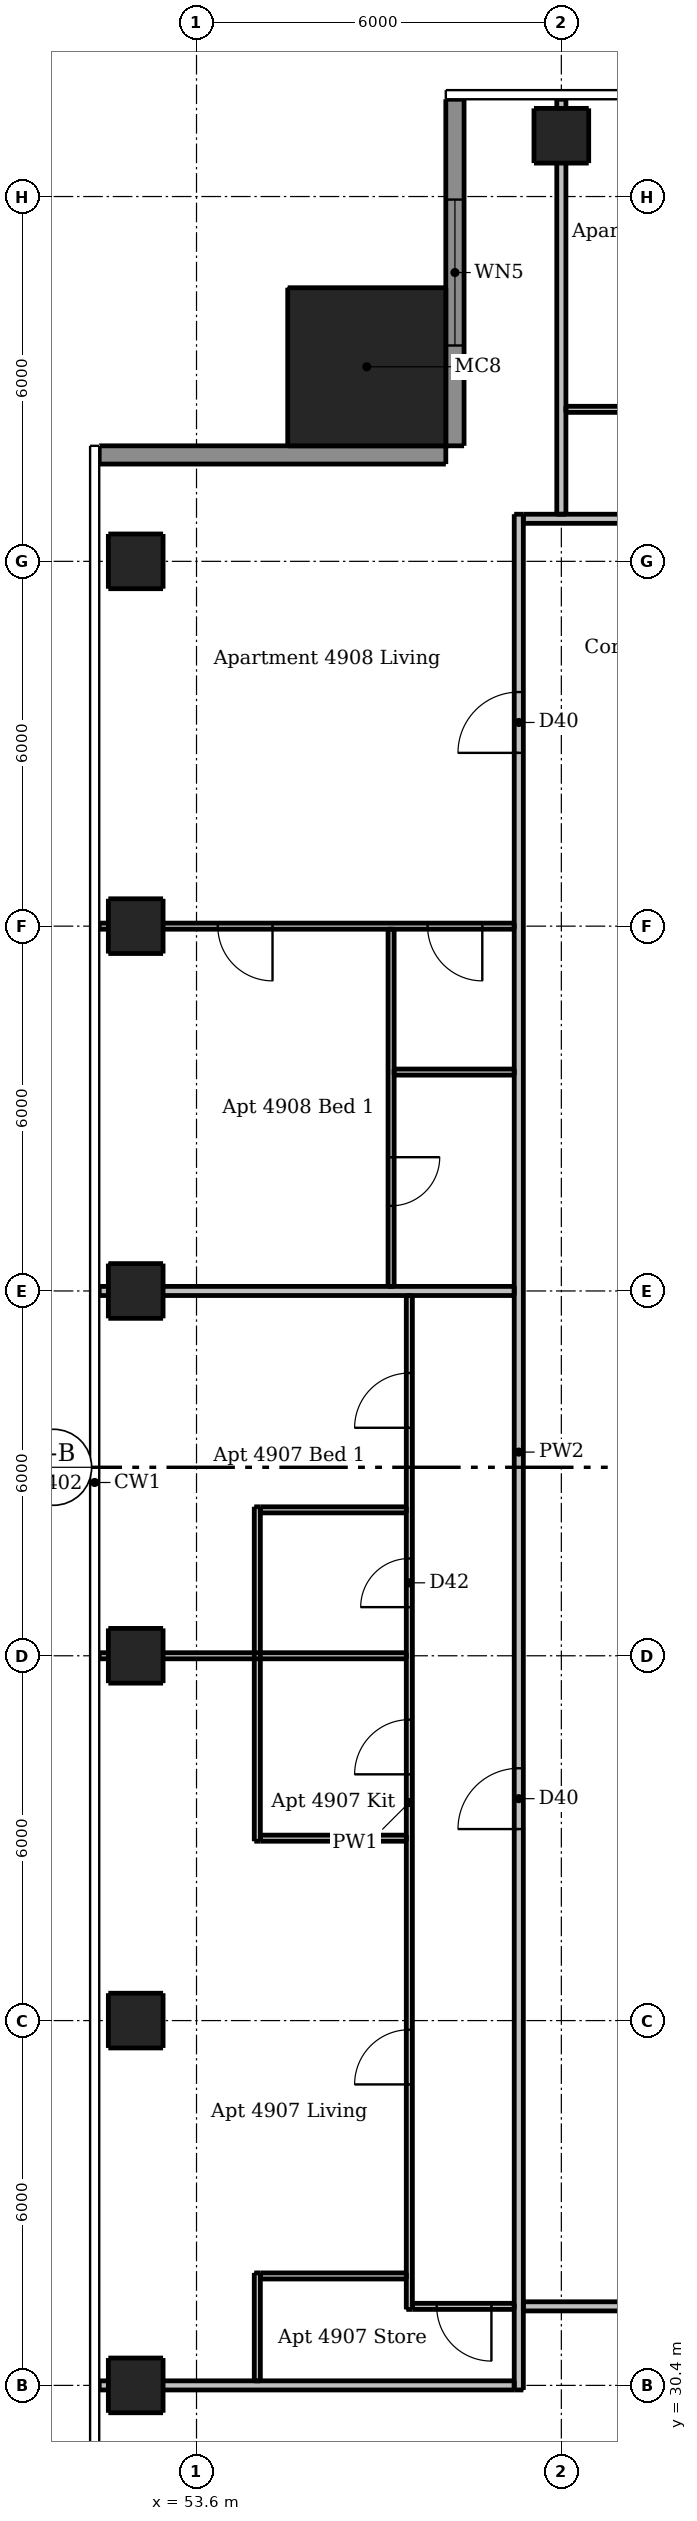
"""IFC4 building model, lengths in metres.
Left out: names, types, materials, properties, quantities, classifications, styles, units other than length and angle.
Written with IfcOpenShell. Run it as: python <this file> out.ifc"""

import sys

from ifc_helpers import new_model, si_unit, direction, frame, frame_2d, origin, origin_2d, place, context, subcontext, project, spatial, rectangle, extrude, element, fill, save


model = new_model("IFC4")
c1 = context("Model", 3, precision=1e-05, world=origin(), true_north=direction((0.0, 1.0)))
c2 = subcontext(c1, "Body", "Model", "MODEL_VIEW")
j1 = project(units=[si_unit("LENGTHUNIT", "METRE"), si_unit("PLANEANGLEUNIT", "RADIAN")], contexts=[c1])
p1 = place(None, origin())
s1 = spatial("IfcSite", under=j1, at=p1, CompositionType="ELEMENT")
p2 = place(p1, origin())
s2 = spatial("IfcBuilding", under=s1, at=p2, CompositionType="ELEMENT")
p3 = place(p2, frame((0.0, 0.0, 187.0)))
s3 = spatial("IfcBuildingStorey", under=s2, at=p3, CompositionType="ELEMENT", Elevation=187.0)
for number, where, z_axis, x_axis in (
    (1, (59.6, 67.4, 0.0), (0.0, 0.0, 1.0), (1.0, 0.0, 0.0)),
    (2, (52.6, 30.4, 0.0), (0.0, 0.0, 1.0), (1.0, 0.0, 0.0)),
    (3, (52.6, 36.4, 0.0), (0.0, 0.0, 1.0), (1.0, 0.0, 0.0)),
    (4, (52.6, 42.4, 0.0), (0.0, 0.0, 1.0), (1.0, 0.0, 0.0)),
    (5, (52.6, 48.4, 0.0), (0.0, 0.0, 1.0), (1.0, 0.0, 0.0)),
    (6, (52.6, 54.4, 0.0), (0.0, 0.0, 1.0), (1.0, 0.0, 0.0)),
    (7, (52.6, 60.4, 0.0), (0.0, 0.0, 1.0), (1.0, 0.0, 0.0)),
):
    element("IfcColumn", number, at=place(p3, frame(where, z_axis=z_axis, x_axis=x_axis)), inside=s3, PredefinedType="COLUMN", context=c2, shape_type="SweptSolid", body=[
        extrude(rectangle(XDim=0.9, YDim=0.9, at=origin_2d()), origin(), (0.0, 0.0, 1.0), 3.05),
    ])
p4 = place(p3, frame((56.4, 63.6, 0.0), z_axis=(0.0, 0.0, 1.0), x_axis=(1.0, 0.0, 0.0)))
e8 = element("IfcColumn", 8, at=p4, inside=s3, PredefinedType="COLUMN", context=c2, shape_type="SweptSolid", body=[
    extrude(rectangle(XDim=2.6, YDim=2.6, at=origin_2d()), origin(), (0.0, 0.0, 1.0), 3.3),
])
p5 = place(p3, frame((57.85, 68.0, 0.0), z_axis=(0.0, 0.0, 1.0), x_axis=(0.0, -1.0, 0.0)))
e9 = element("IfcWall", 9, at=p5, inside=s3, PredefinedType="SOLIDWALL", context=c2, shape_type="SweptSolid", body=[
    extrude(rectangle(XDim=5.7, YDim=0.3, at=frame_2d((2.85, 0.0))), origin(), (0.0, 0.0, 1.0), 3.05),
])
p6 = place(p5, frame((1.65, 0.0, 0.15)))
e10 = element("IfcOpeningElement", 10, at=p6, cuts=e9, PredefinedType="OPENING", context=c2, shape_type="SweptSolid", body=[
    extrude(rectangle(XDim=2.4, YDim=2.1, at=frame_2d((1.2, 1.05))), frame((0.0, 0.16, 0.0), z_axis=(0.0, -1.0, 0.0), x_axis=(1.0, 0.0, 0.0)), (0.0, 0.0, 1.0), 0.32),
])
p7 = place(p3, frame((57.7, 62.15, 0.0), z_axis=(0.0, 0.0, 1.0), x_axis=(-1.0, 0.0, 0.0)))
e11 = element("IfcWall", 11, at=p7, inside=s3, PredefinedType="SOLIDWALL", context=c2, shape_type="SweptSolid", body=[
    extrude(rectangle(XDim=5.7, YDim=0.3, at=frame_2d((2.85, 0.0))), origin(), (0.0, 0.0, 1.0), 3.05),
])
p8 = place(p3, frame((54.6, 30.475, 0.0), z_axis=(0.0, 0.0, 1.0), x_axis=(0.0, 1.0, 0.0)))
e12 = element("IfcWall", 12, at=p8, inside=s3, PredefinedType="PARTITIONING", context=c2, shape_type="SweptSolid", body=[
    extrude(rectangle(XDim=1.775, YDim=0.1, at=frame_2d((0.887, 0.0))), origin(), (0.0, 0.0, 1.0), 3.05),
])
p9 = place(p3, frame((54.6, 39.35, 0.0), z_axis=(0.0, 0.0, 1.0), x_axis=(0.0, 1.0, 0.0)))
e13 = element("IfcWall", 13, at=p9, inside=s3, PredefinedType="PARTITIONING", context=c2, shape_type="SweptSolid", body=[
    extrude(rectangle(XDim=5.5, YDim=0.1, at=frame_2d((2.75, 0.0))), origin(), (0.0, 0.0, 1.0), 3.05),
])
p10 = place(p3, frame((56.8, 54.35, 0.0), z_axis=(0.0, 0.0, 1.0), x_axis=(0.0, -1.0, 0.0)))
e14 = element("IfcWall", 14, at=p10, inside=s3, PredefinedType="PARTITIONING", context=c2, shape_type="SweptSolid", body=[
    extrude(rectangle(XDim=5.875, YDim=0.1, at=frame_2d((2.938, 0.0))), origin(), (0.0, 0.0, 1.0), 3.05),
])
p11 = place(p10, frame((3.75, 0.0, 0.0)))
e15 = element("IfcOpeningElement", 15, at=p11, cuts=e14, PredefinedType="OPENING", context=c2, shape_type="SweptSolid", body=[
    extrude(rectangle(XDim=0.8, YDim=2.1, at=frame_2d((0.4, 1.05))), frame((0.0, 0.06, 0.0), z_axis=(0.0, -1.0, 0.0), x_axis=(1.0, 0.0, 0.0)), (0.0, 0.0, 1.0), 0.12),
])
p12 = place(p3, frame((57.1, 31.65, 0.0), z_axis=(0.0, 0.0, 1.0), x_axis=(0.0, 1.0, 0.0)))
e16 = element("IfcWall", 16, at=p12, inside=s3, PredefinedType="PARTITIONING", context=c2, shape_type="SweptSolid", body=[
    extrude(rectangle(XDim=16.675, YDim=0.1, at=frame_2d((8.337, 0.0))), origin(), (0.0, 0.0, 1.0), 3.05),
])
p13 = place(p12, frame((3.7, 0.0, 0.0)))
e17 = element("IfcOpeningElement", 17, at=p13, cuts=e16, PredefinedType="OPENING", context=c2, shape_type="SweptSolid", body=[
    extrude(rectangle(XDim=0.9, YDim=2.1, at=frame_2d((0.45, 1.05))), frame((0.0, 0.06, 0.0), z_axis=(0.0, -1.0, 0.0), x_axis=(1.0, 0.0, 0.0)), (0.0, 0.0, 1.0), 0.12),
])
p14 = place(p12, frame((8.8, 0.0, 0.0)))
e18 = element("IfcOpeningElement", 18, at=p14, cuts=e16, PredefinedType="OPENING", context=c2, shape_type="SweptSolid", body=[
    extrude(rectangle(XDim=0.9, YDim=2.1, at=frame_2d((0.45, 1.05))), frame((0.0, 0.06, 0.0), z_axis=(0.0, -1.0, 0.0), x_axis=(1.0, 0.0, 0.0)), (0.0, 0.0, 1.0), 0.12),
])
p15 = place(p12, frame((14.5, 0.0, 0.0)))
e19 = element("IfcOpeningElement", 19, at=p15, cuts=e16, PredefinedType="OPENING", context=c2, shape_type="SweptSolid", body=[
    extrude(rectangle(XDim=0.9, YDim=2.1, at=frame_2d((0.45, 1.05))), frame((0.0, 0.06, 0.0), z_axis=(0.0, -1.0, 0.0), x_axis=(1.0, 0.0, 0.0)), (0.0, 0.0, 1.0), 0.12),
])
p16 = place(p12, frame((11.55, 0.0, 0.0)))
e20 = element("IfcOpeningElement", 20, at=p16, cuts=e16, PredefinedType="OPENING", context=c2, shape_type="SweptSolid", body=[
    extrude(rectangle(XDim=0.8, YDim=2.1, at=frame_2d((0.4, 1.05))), frame((0.0, 0.06, 0.0), z_axis=(0.0, -1.0, 0.0), x_axis=(1.0, 0.0, 0.0)), (0.0, 0.0, 1.0), 0.12),
])
p17 = place(p3, frame((59.675, 62.9, 0.0), z_axis=(0.0, 0.0, 1.0), x_axis=(1.0, 0.0, 0.0)))
e21 = element("IfcWall", 21, at=p17, inside=s3, PredefinedType="PARTITIONING", context=c2, shape_type="SweptSolid", body=[
    extrude(rectangle(XDim=17.85, YDim=0.1, at=frame_2d((8.925, 0.0))), origin(), (0.0, 0.0, 1.0), 3.05),
])
p18 = place(p17, frame((10.875, 0.0, 0.0)))
e22 = element("IfcOpeningElement", 22, at=p18, cuts=e21, PredefinedType="OPENING", context=c2, shape_type="SweptSolid", body=[
    extrude(rectangle(XDim=0.9, YDim=2.1, at=frame_2d((0.45, 1.05))), frame((0.0, 0.06, 0.0), z_axis=(0.0, -1.0, 0.0), x_axis=(1.0, 0.0, 0.0)), (0.0, 0.0, 1.0), 0.12),
])
p19 = place(p17, frame((15.975, 0.0, 0.0)))
e23 = element("IfcOpeningElement", 23, at=p19, cuts=e21, PredefinedType="OPENING", context=c2, shape_type="SweptSolid", body=[
    extrude(rectangle(XDim=0.9, YDim=2.1, at=frame_2d((0.45, 1.05))), frame((0.0, 0.06, 0.0), z_axis=(0.0, -1.0, 0.0), x_axis=(1.0, 0.0, 0.0)), (0.0, 0.0, 1.0), 0.12),
])
p20 = place(p17, frame((6.375, 0.0, 0.0)))
e24 = element("IfcOpeningElement", 24, at=p20, cuts=e21, PredefinedType="OPENING", context=c2, shape_type="SweptSolid", body=[
    extrude(rectangle(XDim=0.9, YDim=2.1, at=frame_2d((0.45, 1.05))), frame((0.0, 0.06, 0.0), z_axis=(0.0, -1.0, 0.0), x_axis=(1.0, 0.0, 0.0)), (0.0, 0.0, 1.0), 0.12),
])
p21 = place(p17, frame((1.275, 0.0, 0.0)))
e25 = element("IfcOpeningElement", 25, at=p21, cuts=e21, PredefinedType="OPENING", context=c2, shape_type="SweptSolid", body=[
    extrude(rectangle(XDim=0.9, YDim=2.1, at=frame_2d((0.45, 1.05))), frame((0.0, 0.06, 0.0), z_axis=(0.0, -1.0, 0.0), x_axis=(1.0, 0.0, 0.0)), (0.0, 0.0, 1.0), 0.12),
])
p22 = place(p17, frame((4.325, 0.0, 0.0)))
e26 = element("IfcOpeningElement", 26, at=p22, cuts=e21, PredefinedType="OPENING", context=c2, shape_type="SweptSolid", body=[
    extrude(rectangle(XDim=0.8, YDim=2.1, at=frame_2d((0.4, 1.05))), frame((0.0, 0.06, 0.0), z_axis=(0.0, -1.0, 0.0), x_axis=(1.0, 0.0, 0.0)), (0.0, 0.0, 1.0), 0.12),
])
p23 = place(p3, frame((58.825, 54.4, 0.0), z_axis=(0.0, 0.0, 1.0), x_axis=(-1.0, 0.0, 0.0)))
e27 = element("IfcWall", 27, at=p23, inside=s3, PredefinedType="PARTITIONING", context=c2, shape_type="SweptSolid", body=[
    extrude(rectangle(XDim=6.825, YDim=0.1, at=frame_2d((3.413, 0.0))), origin(), (0.0, 0.0, 1.0), 2.516),
])
p24 = place(p23, frame((0.525, 0.0, 0.0)))
e28 = element("IfcOpeningElement", 28, at=p24, cuts=e27, PredefinedType="OPENING", context=c2, shape_type="SweptSolid", body=[
    extrude(rectangle(XDim=0.9, YDim=2.1, at=frame_2d((0.45, 1.05))), frame((0.0, 0.06, 0.0), z_axis=(0.0, -1.0, 0.0), x_axis=(1.0, 0.0, 0.0)), (0.0, 0.0, 1.0), 0.12),
])
p25 = place(p23, frame((3.975, 0.0, 0.0)))
e29 = element("IfcOpeningElement", 29, at=p25, cuts=e27, PredefinedType="OPENING", context=c2, shape_type="SweptSolid", body=[
    extrude(rectangle(XDim=0.9, YDim=2.1, at=frame_2d((0.45, 1.05))), frame((0.0, 0.06, 0.0), z_axis=(0.0, -1.0, 0.0), x_axis=(1.0, 0.0, 0.0)), (0.0, 0.0, 1.0), 0.12),
])
p26 = place(p3, frame((56.85, 52.0, 0.0), z_axis=(0.0, 0.0, 1.0), x_axis=(1.0, 0.0, 0.0)))
e30 = element("IfcWall", 30, at=p26, inside=s3, PredefinedType="PARTITIONING", context=c2, shape_type="SweptSolid", body=[
    extrude(rectangle(XDim=1.975, YDim=0.1, at=frame_2d((0.987, 0.0))), origin(), (0.0, 0.0, 1.0), 3.05),
])
p27 = place(p3, frame((54.65, 44.8, 0.0), z_axis=(0.0, 0.0, 1.0), x_axis=(1.0, 0.0, 0.0)))
e31 = element("IfcWall", 31, at=p27, inside=s3, PredefinedType="PARTITIONING", context=c2, shape_type="SweptSolid", body=[
    extrude(rectangle(XDim=2.4, YDim=0.1, at=frame_2d((1.2, 0.0))), origin(), (0.0, 0.0, 1.0), 3.05),
])
p28 = place(p3, frame((52.0, 42.4, 0.0), z_axis=(0.0, 0.0, 1.0), x_axis=(1.0, 0.0, 0.0)))
e32 = element("IfcWall", 32, at=p28, inside=s3, PredefinedType="PARTITIONING", context=c2, shape_type="SweptSolid", body=[
    extrude(rectangle(XDim=5.05, YDim=0.1, at=frame_2d((2.525, 0.0))), origin(), (0.0, 0.0, 1.0), 2.516),
])
for number, where, z_axis, x_axis in (
    (33, (54.65, 39.4, 0.0), (0.0, 0.0, 1.0), (1.0, 0.0, 0.0)),
    (34, (54.65, 32.2, 0.0), (0.0, 0.0, 1.0), (1.0, 0.0, 0.0)),
):
    element("IfcWall", number, at=place(p3, frame(where, z_axis=z_axis, x_axis=x_axis)), inside=s3, PredefinedType="PARTITIONING", context=c2, shape_type="SweptSolid", body=[
        extrude(rectangle(XDim=2.4, YDim=0.1, at=frame_2d((1.2, 0.0))), origin(), (0.0, 0.0, 1.0), 3.05),
    ])
p29 = place(p3, frame((58.825, 31.7, 0.0), z_axis=(0.0, 0.0, 1.0), x_axis=(-1.0, 0.0, 0.0)))
e35 = element("IfcWall", 35, at=p29, inside=s3, PredefinedType="PARTITIONING", context=c2, shape_type="SweptSolid", body=[
    extrude(rectangle(XDim=1.675, YDim=0.1, at=frame_2d((0.837, 0.0))), origin(), (0.0, 0.0, 1.0), 3.05),
])
p30 = place(p29, frame((0.375, 0.0, 0.0)))
e36 = element("IfcOpeningElement", 36, at=p30, cuts=e35, PredefinedType="OPENING", context=c2, shape_type="SweptSolid", body=[
    extrude(rectangle(XDim=0.9, YDim=2.1, at=frame_2d((0.45, 1.05))), frame((0.0, 0.06, 0.0), z_axis=(0.0, -1.0, 0.0), x_axis=(1.0, 0.0, 0.0)), (0.0, 0.0, 1.0), 0.12),
])
p31 = place(p3, frame((58.9, 30.325, 0.0), z_axis=(0.0, 0.0, 1.0), x_axis=(0.0, 1.0, 0.0)))
e37 = element("IfcWall", 37, at=p31, inside=s3, PredefinedType="PARTITIONING", context=c2, shape_type="SweptSolid", body=[
    extrude(rectangle(XDim=30.85, YDim=0.15, at=frame_2d((15.425, 0.0))), origin(), (0.0, 0.0, 1.0), 3.05),
])
p32 = place(p31, frame((9.225, 0.0, 0.0)))
e38 = element("IfcOpeningElement", 38, at=p32, cuts=e37, PredefinedType="OPENING", context=c2, shape_type="SweptSolid", body=[
    extrude(rectangle(XDim=1.0, YDim=2.1, at=frame_2d((0.5, 1.05))), frame((0.0, 0.085, 0.0), z_axis=(0.0, -1.0, 0.0), x_axis=(1.0, 0.0, 0.0)), (0.0, 0.0, 1.0), 0.17),
])
p33 = place(p31, frame((26.925, 0.0, 0.0)))
e39 = element("IfcOpeningElement", 39, at=p33, cuts=e37, PredefinedType="OPENING", context=c2, shape_type="SweptSolid", body=[
    extrude(rectangle(XDim=1.0, YDim=2.1, at=frame_2d((0.5, 1.05))), frame((0.0, 0.085, 0.0), z_axis=(0.0, -1.0, 0.0), x_axis=(1.0, 0.0, 0.0)), (0.0, 0.0, 1.0), 0.17),
])
p34 = place(p3, frame((59.6, 61.175, 0.0), z_axis=(0.0, 0.0, 1.0), x_axis=(0.0, 1.0, 0.0)))
e40 = element("IfcWall", 40, at=p34, inside=s3, PredefinedType="PARTITIONING", context=c2, shape_type="SweptSolid", body=[
    extrude(rectangle(XDim=6.825, YDim=0.15, at=frame_2d((3.413, 0.0))), origin(), (0.0, 0.0, 1.0), 2.51),
])
p35 = place(p3, frame((58.975, 61.1, 0.0), z_axis=(0.0, 0.0, 1.0), x_axis=(1.0, 0.0, 0.0)))
e41 = element("IfcWall", 41, at=p35, inside=s3, PredefinedType="PARTITIONING", context=c2, shape_type="SweptSolid", body=[
    extrude(rectangle(XDim=29.25, YDim=0.15, at=frame_2d((14.625, 0.0))), origin(), (0.0, 0.0, 1.0), 3.05),
])
p36 = place(p35, frame((9.125, 0.0, 0.0)))
e42 = element("IfcOpeningElement", 42, at=p36, cuts=e41, PredefinedType="OPENING", context=c2, shape_type="SweptSolid", body=[
    extrude(rectangle(XDim=1.0, YDim=2.1, at=frame_2d((0.5, 1.05))), frame((0.0, 0.085, 0.0), z_axis=(0.0, -1.0, 0.0), x_axis=(1.0, 0.0, 0.0)), (0.0, 0.0, 1.0), 0.17),
])
p37 = place(p35, frame((26.475, 0.0, 0.0)))
e43 = element("IfcOpeningElement", 43, at=p37, cuts=e41, PredefinedType="OPENING", context=c2, shape_type="SweptSolid", body=[
    extrude(rectangle(XDim=1.0, YDim=2.1, at=frame_2d((0.5, 1.05))), frame((0.0, 0.085, 0.0), z_axis=(0.0, -1.0, 0.0), x_axis=(1.0, 0.0, 0.0)), (0.0, 0.0, 1.0), 0.17),
])
p38 = place(p3, frame((52.0, 48.4, 0.0), z_axis=(0.0, 0.0, 1.0), x_axis=(1.0, 0.0, 0.0)))
e44 = element("IfcWall", 44, at=p38, inside=s3, PredefinedType="PARTITIONING", context=c2, shape_type="SweptSolid", body=[
    extrude(rectangle(XDim=6.825, YDim=0.15, at=frame_2d((3.413, 0.0))), origin(), (0.0, 0.0, 1.0), 2.516),
])
p39 = place(p3, frame((89.525, 31.7, 0.0), z_axis=(0.0, 0.0, 1.0), x_axis=(-1.0, 0.0, 0.0)))
e45 = element("IfcWall", 45, at=p39, inside=s3, PredefinedType="PARTITIONING", context=c2, shape_type="SweptSolid", body=[
    extrude(rectangle(XDim=30.55, YDim=0.15, at=frame_2d((15.275, 0.0))), origin(), (0.0, 0.0, 1.0), 3.05),
])
p40 = place(p39, frame((26.775, 0.0, 0.0)))
e46 = element("IfcOpeningElement", 46, at=p40, cuts=e45, PredefinedType="OPENING", context=c2, shape_type="SweptSolid", body=[
    extrude(rectangle(XDim=1.0, YDim=2.1, at=frame_2d((0.5, 1.05))), frame((0.0, 0.085, 0.0), z_axis=(0.0, -1.0, 0.0), x_axis=(1.0, 0.0, 0.0)), (0.0, 0.0, 1.0), 0.17),
])
p41 = place(p39, frame((9.075, 0.0, 0.0)))
e47 = element("IfcOpeningElement", 47, at=p41, cuts=e45, PredefinedType="OPENING", context=c2, shape_type="SweptSolid", body=[
    extrude(rectangle(XDim=1.0, YDim=2.1, at=frame_2d((0.5, 1.05))), frame((0.0, 0.085, 0.0), z_axis=(0.0, -1.0, 0.0), x_axis=(1.0, 0.0, 0.0)), (0.0, 0.0, 1.0), 0.17),
])
p42 = place(p3, frame((52.0, 30.4, 0.0), z_axis=(0.0, 0.0, 1.0), x_axis=(1.0, 0.0, 0.0)))
e48 = element("IfcWall", 48, at=p42, inside=s3, PredefinedType="PARTITIONING", context=c2, shape_type="SweptSolid", body=[
    extrude(rectangle(XDim=6.825, YDim=0.15, at=frame_2d((3.413, 0.0))), origin(), (0.0, 0.0, 1.0), 2.647),
])
p43 = place(p6, origin())
e49 = element("IfcWindow", 49, at=p43, inside=s3, PartitioningType="DOUBLE_PANEL_VERTICAL", PredefinedType="WINDOW", context=c2, shape_type="SweptSolid", body=[
    extrude(rectangle(XDim=2.4, YDim=2.1, at=frame_2d((1.2, 1.05))), frame((0.0, 0.03, 0.0), z_axis=(0.0, -1.0, 0.0), x_axis=(1.0, 0.0, 0.0)), (0.0, 0.0, 1.0), 0.06),
])
fill(e10, e49)
p44 = place(p32, origin())
e50 = element("IfcDoor", 50, at=p44, inside=s3, OperationType="SINGLE_SWING_LEFT", PredefinedType="DOOR", context=c2, shape_type="SweptSolid", body=[
    extrude(rectangle(XDim=1.0, YDim=2.1, at=frame_2d((0.5, 1.05))), frame((0.0, 0.025, 0.0), z_axis=(0.0, -1.0, 0.0), x_axis=(1.0, 0.0, 0.0)), (0.0, 0.0, 1.0), 0.05),
])
fill(e38, e50)
p45 = place(p13, origin())
e51 = element("IfcDoor", 51, at=p45, inside=s3, OperationType="SINGLE_SWING_LEFT", PredefinedType="DOOR", context=c2, shape_type="SweptSolid", body=[
    extrude(rectangle(XDim=0.9, YDim=2.1, at=frame_2d((0.45, 1.05))), frame((0.0, 0.025, 0.0), z_axis=(0.0, -1.0, 0.0), x_axis=(1.0, 0.0, 0.0)), (0.0, 0.0, 1.0), 0.05),
])
fill(e17, e51)
p46 = place(p14, origin())
e52 = element("IfcDoor", 52, at=p46, inside=s3, OperationType="SINGLE_SWING_LEFT", PredefinedType="DOOR", context=c2, shape_type="SweptSolid", body=[
    extrude(rectangle(XDim=0.9, YDim=2.1, at=frame_2d((0.45, 1.05))), frame((0.0, 0.025, 0.0), z_axis=(0.0, -1.0, 0.0), x_axis=(1.0, 0.0, 0.0)), (0.0, 0.0, 1.0), 0.05),
])
fill(e18, e52)
p47 = place(p30, origin())
e53 = element("IfcDoor", 53, at=p47, inside=s3, OperationType="SINGLE_SWING_LEFT", PredefinedType="DOOR", context=c2, shape_type="SweptSolid", body=[
    extrude(rectangle(XDim=0.9, YDim=2.1, at=frame_2d((0.45, 1.05))), frame((0.0, 0.025, 0.0), z_axis=(0.0, -1.0, 0.0), x_axis=(1.0, 0.0, 0.0)), (0.0, 0.0, 1.0), 0.05),
])
fill(e36, e53)
p48 = place(p15, origin())
e54 = element("IfcDoor", 54, at=p48, inside=s3, OperationType="SINGLE_SWING_LEFT", PredefinedType="DOOR", context=c2, shape_type="SweptSolid", body=[
    extrude(rectangle(XDim=0.9, YDim=2.1, at=frame_2d((0.45, 1.05))), frame((0.0, 0.025, 0.0), z_axis=(0.0, -1.0, 0.0), x_axis=(1.0, 0.0, 0.0)), (0.0, 0.0, 1.0), 0.05),
])
fill(e19, e54)
p49 = place(p16, origin())
e55 = element("IfcDoor", 55, at=p49, inside=s3, OperationType="SINGLE_SWING_LEFT", PredefinedType="DOOR", context=c2, shape_type="SweptSolid", body=[
    extrude(rectangle(XDim=0.8, YDim=2.1, at=frame_2d((0.4, 1.05))), frame((0.0, 0.025, 0.0), z_axis=(0.0, -1.0, 0.0), x_axis=(1.0, 0.0, 0.0)), (0.0, 0.0, 1.0), 0.05),
])
fill(e20, e55)
p50 = place(p33, origin())
e56 = element("IfcDoor", 56, at=p50, inside=s3, OperationType="SINGLE_SWING_LEFT", PredefinedType="DOOR", context=c2, shape_type="SweptSolid", body=[
    extrude(rectangle(XDim=1.0, YDim=2.1, at=frame_2d((0.5, 1.05))), frame((0.0, 0.025, 0.0), z_axis=(0.0, -1.0, 0.0), x_axis=(1.0, 0.0, 0.0)), (0.0, 0.0, 1.0), 0.05),
])
fill(e39, e56)
p51 = place(p24, origin())
e57 = element("IfcDoor", 57, at=p51, inside=s3, OperationType="SINGLE_SWING_LEFT", PredefinedType="DOOR", context=c2, shape_type="SweptSolid", body=[
    extrude(rectangle(XDim=0.9, YDim=2.1, at=frame_2d((0.45, 1.05))), frame((0.0, 0.025, 0.0), z_axis=(0.0, -1.0, 0.0), x_axis=(1.0, 0.0, 0.0)), (0.0, 0.0, 1.0), 0.05),
])
fill(e28, e57)
p52 = place(p25, origin())
e58 = element("IfcDoor", 58, at=p52, inside=s3, OperationType="SINGLE_SWING_LEFT", PredefinedType="DOOR", context=c2, shape_type="SweptSolid", body=[
    extrude(rectangle(XDim=0.9, YDim=2.1, at=frame_2d((0.45, 1.05))), frame((0.0, 0.025, 0.0), z_axis=(0.0, -1.0, 0.0), x_axis=(1.0, 0.0, 0.0)), (0.0, 0.0, 1.0), 0.05),
])
fill(e29, e58)
p53 = place(p11, origin())
e59 = element("IfcDoor", 59, at=p53, inside=s3, OperationType="SINGLE_SWING_LEFT", PredefinedType="DOOR", context=c2, shape_type="SweptSolid", body=[
    extrude(rectangle(XDim=0.8, YDim=2.1, at=frame_2d((0.4, 1.05))), frame((0.0, 0.025, 0.0), z_axis=(0.0, -1.0, 0.0), x_axis=(1.0, 0.0, 0.0)), (0.0, 0.0, 1.0), 0.05),
])
fill(e15, e59)
save(model, sys.argv[1])
